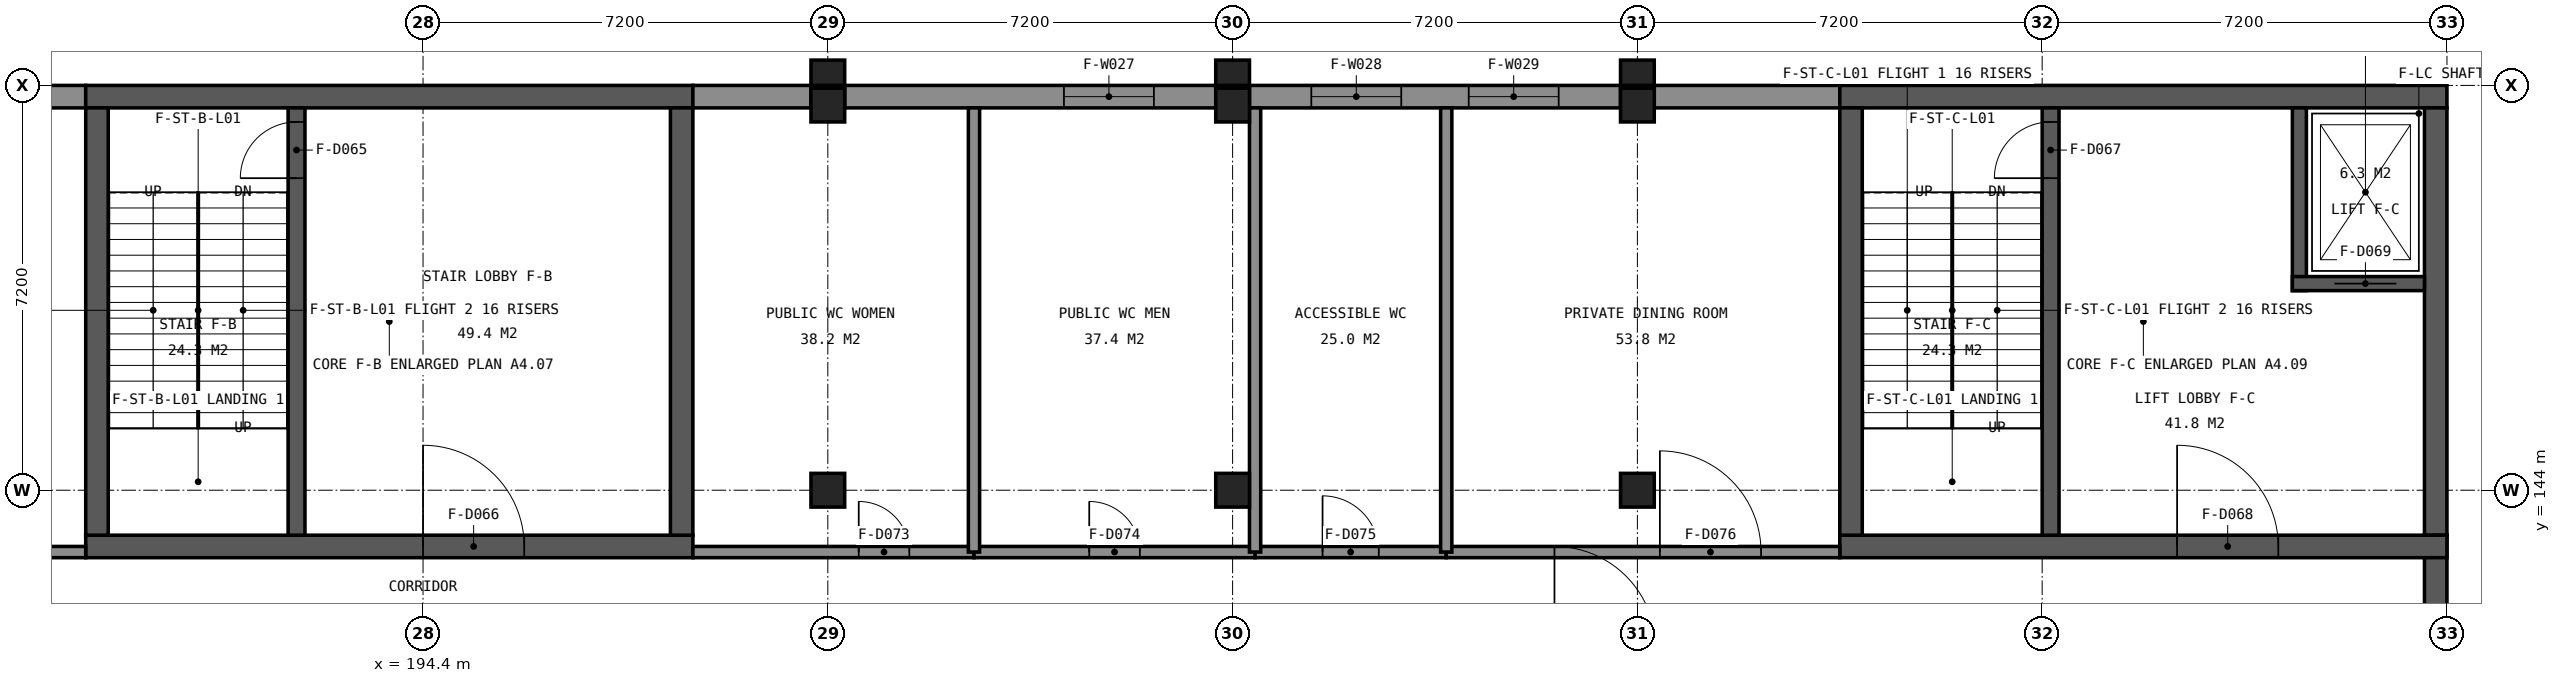
"""IFC4 building model, lengths in metres.
Left out: names, types, materials, properties, quantities, classifications, styles, units other than length and angle.
Written with IfcOpenShell. Run it as: python <this file> out.ifc"""

import sys

from ifc_helpers import new_model, si_unit, direction, frame, frame_2d, origin, origin_2d, place, context, subcontext, project, spatial, rectangle, extrude, element, fill, save


model = new_model("IFC4")
c1 = context("Model", 3, precision=1e-05, world=origin(), true_north=direction((0.0, 1.0)))
c2 = subcontext(c1, "Body", "Model", "MODEL_VIEW")
j1 = project(units=[si_unit("LENGTHUNIT", "METRE"), si_unit("PLANEANGLEUNIT", "RADIAN")], contexts=[c1])
p1 = place(None, origin())
s1 = spatial("IfcSite", under=j1, at=p1, CompositionType="ELEMENT")
p2 = place(p1, origin())
s2 = spatial("IfcBuilding", under=s1, at=p2, CompositionType="ELEMENT")
p3 = place(p2, frame((0.0, 0.0, 9.6)))
s3 = spatial("IfcBuildingStorey", under=s2, at=p3, CompositionType="ELEMENT", Elevation=9.6)
for number, where, z_axis, x_axis in (
    (1, (201.6, 144.0, 0.0), (0.0, 0.0, 1.0), (1.0, 0.0, 0.0)),
    (2, (208.8, 144.0, 0.0), (0.0, 0.0, 1.0), (1.0, 0.0, 0.0)),
    (3, (216.0, 144.0, 0.0), (0.0, 0.0, 1.0), (1.0, 0.0, 0.0)),
    (4, (201.6, 150.85, 0.0), (0.0, 0.0, 1.0), (1.0, 0.0, 0.0)),
    (5, (208.8, 150.85, 0.0), (0.0, 0.0, 1.0), (1.0, 0.0, 0.0)),
    (6, (216.0, 150.85, 0.0), (0.0, 0.0, 1.0), (1.0, 0.0, 0.0)),
):
    element("IfcColumn", number, at=place(p3, frame(where, z_axis=z_axis, x_axis=x_axis)), inside=s3, PredefinedType="COLUMN", context=c2, shape_type="SweptSolid", body=[
        extrude(rectangle(XDim=0.6, YDim=0.6, at=origin_2d()), origin(), (0.0, 0.0, 1.0), 4.8),
    ])
p4 = place(p3, frame((187.5, 151.0, 0.0), z_axis=(0.0, 0.0, 1.0), x_axis=(1.0, 0.0, 0.0)))
e7 = element("IfcWall", 7, at=p4, inside=s3, PredefinedType="SOLIDWALL", context=c2, shape_type="SweptSolid", body=[
    extrude(rectangle(XDim=0.9, YDim=0.4, at=frame_2d((0.45, 0.0))), origin(), (0.0, 0.0, 1.0), 3.95),
])
p5 = place(p3, frame((188.4, 151.0, 0.0), z_axis=(0.0, 0.0, 1.0), x_axis=(1.0, 0.0, 0.0)))
e8 = element("IfcWall", 8, at=p5, inside=s3, PredefinedType="SHEAR", context=c2, shape_type="SweptSolid", body=[
    extrude(rectangle(XDim=10.8, YDim=0.4, at=frame_2d((5.4, 0.0))), origin(), (0.0, 0.0, 1.0), 4.55),
])
p6 = place(p3, frame((199.2, 151.0, 0.0), z_axis=(0.0, 0.0, 1.0), x_axis=(1.0, 0.0, 0.0)))
e9 = element("IfcWall", 9, at=p6, inside=s3, PredefinedType="SOLIDWALL", context=c2, shape_type="SweptSolid", body=[
    extrude(rectangle(XDim=2.1, YDim=0.4, at=frame_2d((1.05, 0.0))), origin(), (0.0, 0.0, 1.0), 3.95),
])
p7 = place(p3, frame((201.9, 151.0, 0.0), z_axis=(0.0, 0.0, 1.0), x_axis=(1.0, 0.0, 0.0)))
e10 = element("IfcWall", 10, at=p7, inside=s3, PredefinedType="SOLIDWALL", context=c2, shape_type="SweptSolid", body=[
    extrude(rectangle(XDim=6.6, YDim=0.4, at=frame_2d((3.3, 0.0))), origin(), (0.0, 0.0, 1.0), 3.95),
])
p8 = place(p7, frame((3.9, 0.0, 0.8)))
e11 = element("IfcOpeningElement", 11, at=p8, cuts=e10, PredefinedType="OPENING", context=c2, shape_type="SweptSolid", body=[
    extrude(rectangle(XDim=1.6, YDim=3.1, at=frame_2d((0.8, 1.55))), frame((0.0, 0.21, 0.0), z_axis=(0.0, -1.0, 0.0), x_axis=(1.0, 0.0, 0.0)), (0.0, 0.0, 1.0), 0.42),
])
p9 = place(p3, frame((209.1, 151.0, 0.0), z_axis=(0.0, 0.0, 1.0), x_axis=(1.0, 0.0, 0.0)))
e12 = element("IfcWall", 12, at=p9, inside=s3, PredefinedType="SOLIDWALL", context=c2, shape_type="SweptSolid", body=[
    extrude(rectangle(XDim=6.6, YDim=0.4, at=frame_2d((3.3, 0.0))), origin(), (0.0, 0.0, 1.0), 3.95),
])
p10 = place(p9, frame((1.1, 0.0, 0.8)))
e13 = element("IfcOpeningElement", 13, at=p10, cuts=e12, PredefinedType="OPENING", context=c2, shape_type="SweptSolid", body=[
    extrude(rectangle(XDim=1.6, YDim=3.1, at=frame_2d((0.8, 1.55))), frame((0.0, 0.21, 0.0), z_axis=(0.0, -1.0, 0.0), x_axis=(1.0, 0.0, 0.0)), (0.0, 0.0, 1.0), 0.42),
])
p11 = place(p9, frame((3.9, 0.0, 0.8)))
e14 = element("IfcOpeningElement", 14, at=p11, cuts=e12, PredefinedType="OPENING", context=c2, shape_type="SweptSolid", body=[
    extrude(rectangle(XDim=1.6, YDim=3.1, at=frame_2d((0.8, 1.55))), frame((0.0, 0.21, 0.0), z_axis=(0.0, -1.0, 0.0), x_axis=(1.0, 0.0, 0.0)), (0.0, 0.0, 1.0), 0.42),
])
p12 = place(p3, frame((216.3, 151.0, 0.0), z_axis=(0.0, 0.0, 1.0), x_axis=(1.0, 0.0, 0.0)))
e15 = element("IfcWall", 15, at=p12, inside=s3, PredefinedType="SOLIDWALL", context=c2, shape_type="SweptSolid", body=[
    extrude(rectangle(XDim=3.3, YDim=0.4, at=frame_2d((1.65, 0.0))), origin(), (0.0, 0.0, 1.0), 3.95),
])
p13 = place(p3, frame((219.6, 151.0, 0.0), z_axis=(0.0, 0.0, 1.0), x_axis=(1.0, 0.0, 0.0)))
e16 = element("IfcWall", 16, at=p13, inside=s3, PredefinedType="SHEAR", context=c2, shape_type="SweptSolid", body=[
    extrude(rectangle(XDim=10.8, YDim=0.4, at=frame_2d((5.4, 0.0))), origin(), (0.0, 0.0, 1.0), 4.55),
])
p14 = place(p3, frame((230.2, 143.2, 0.0), z_axis=(0.0, 0.0, 1.0), x_axis=(0.0, -1.0, 0.0)))
e17 = element("IfcWall", 17, at=p14, inside=s3, PredefinedType="SHEAR", context=c2, shape_type="SweptSolid", body=[
    extrude(rectangle(XDim=6.1, YDim=0.4, at=frame_2d((3.05, 0.0))), origin(), (0.0, 0.0, 1.0), 3.95),
])
p15 = place(p14, frame((3.65, 0.0, 0.8)))
e18 = element("IfcOpeningElement", 18, at=p15, cuts=e17, PredefinedType="OPENING", context=c2, shape_type="SweptSolid", body=[
    extrude(rectangle(XDim=1.6, YDim=3.1, at=frame_2d((0.8, 1.55))), frame((0.0, 0.21, 0.0), z_axis=(0.0, -1.0, 0.0), x_axis=(1.0, 0.0, 0.0)), (0.0, 0.0, 1.0), 0.42),
])
p16 = place(p3, frame((230.2, 150.8, 0.0), z_axis=(0.0, 0.0, 1.0), x_axis=(0.0, -1.0, 0.0)))
e19 = element("IfcWall", 19, at=p16, inside=s3, PredefinedType="SHEAR", context=c2, shape_type="SweptSolid", body=[
    extrude(rectangle(XDim=7.6, YDim=0.4, at=frame_2d((3.8, 0.0))), origin(), (0.0, 0.0, 1.0), 4.55),
])
p17 = place(p3, frame((188.4, 143.0, 0.0), z_axis=(0.0, 0.0, 1.0), x_axis=(1.0, 0.0, 0.0)))
e20 = element("IfcWall", 20, at=p17, inside=s3, PredefinedType="SHEAR", context=c2, shape_type="SweptSolid", body=[
    extrude(rectangle(XDim=10.8, YDim=0.4, at=frame_2d((5.4, 0.0))), origin(), (0.0, 0.0, 1.0), 4.55),
])
p18 = place(p17, frame((6.0, 0.0, 0.0)))
e21 = element("IfcOpeningElement", 21, at=p18, cuts=e20, PredefinedType="OPENING", context=c2, shape_type="SweptSolid", body=[
    extrude(rectangle(XDim=1.8, YDim=2.1, at=frame_2d((0.9, 1.05))), frame((0.0, 0.21, 0.0), z_axis=(0.0, -1.0, 0.0), x_axis=(1.0, 0.0, 0.0)), (0.0, 0.0, 1.0), 0.42),
])
for number, where, z_axis, x_axis in (
    (22, (188.6, 143.2, 0.0), (0.0, 0.0, 1.0), (0.0, 1.0, 0.0)),
    (23, (199.0, 143.2, 0.0), (0.0, 0.0, 1.0), (0.0, 1.0, 0.0)),
):
    element("IfcWall", number, at=place(p3, frame(where, z_axis=z_axis, x_axis=x_axis)), inside=s3, PredefinedType="SHEAR", context=c2, shape_type="SweptSolid", body=[
        extrude(rectangle(XDim=7.6, YDim=0.4, at=frame_2d((3.8, 0.0))), origin(), (0.0, 0.0, 1.0), 4.55),
    ])
p19 = place(p3, frame((192.15, 143.2, 0.0), z_axis=(0.0, 0.0, 1.0), x_axis=(0.0, 1.0, 0.0)))
e24 = element("IfcWall", 24, at=p19, inside=s3, PredefinedType="SHEAR", context=c2, shape_type="SweptSolid", body=[
    extrude(rectangle(XDim=7.6, YDim=0.3, at=frame_2d((3.8, 0.0))), origin(), (0.0, 0.0, 1.0), 4.55),
])
p20 = place(p19, frame((6.35, 0.0, 0.0)))
e25 = element("IfcOpeningElement", 25, at=p20, cuts=e24, PredefinedType="OPENING", context=c2, shape_type="SweptSolid", body=[
    extrude(rectangle(XDim=1.0, YDim=2.1, at=frame_2d((0.5, 1.05))), frame((0.0, 0.16, 0.0), z_axis=(0.0, -1.0, 0.0), x_axis=(1.0, 0.0, 0.0)), (0.0, 0.0, 1.0), 0.32),
])
p21 = place(p3, frame((219.6, 143.0, 0.0), z_axis=(0.0, 0.0, 1.0), x_axis=(1.0, 0.0, 0.0)))
e26 = element("IfcWall", 26, at=p21, inside=s3, PredefinedType="SHEAR", context=c2, shape_type="SweptSolid", body=[
    extrude(rectangle(XDim=10.8, YDim=0.4, at=frame_2d((5.4, 0.0))), origin(), (0.0, 0.0, 1.0), 4.55),
])
p22 = place(p21, frame((6.0, 0.0, 0.0)))
e27 = element("IfcOpeningElement", 27, at=p22, cuts=e26, PredefinedType="OPENING", context=c2, shape_type="SweptSolid", body=[
    extrude(rectangle(XDim=1.8, YDim=2.1, at=frame_2d((0.9, 1.05))), frame((0.0, 0.21, 0.0), z_axis=(0.0, -1.0, 0.0), x_axis=(1.0, 0.0, 0.0)), (0.0, 0.0, 1.0), 0.42),
])
p23 = place(p3, frame((219.8, 143.2, 0.0), z_axis=(0.0, 0.0, 1.0), x_axis=(0.0, 1.0, 0.0)))
e28 = element("IfcWall", 28, at=p23, inside=s3, PredefinedType="SHEAR", context=c2, shape_type="SweptSolid", body=[
    extrude(rectangle(XDim=7.6, YDim=0.4, at=frame_2d((3.8, 0.0))), origin(), (0.0, 0.0, 1.0), 4.55),
])
p24 = place(p3, frame((223.35, 143.2, 0.0), z_axis=(0.0, 0.0, 1.0), x_axis=(0.0, 1.0, 0.0)))
e29 = element("IfcWall", 29, at=p24, inside=s3, PredefinedType="SHEAR", context=c2, shape_type="SweptSolid", body=[
    extrude(rectangle(XDim=7.6, YDim=0.3, at=frame_2d((3.8, 0.0))), origin(), (0.0, 0.0, 1.0), 4.55),
])
p25 = place(p24, frame((6.35, 0.0, 0.0)))
e30 = element("IfcOpeningElement", 30, at=p25, cuts=e29, PredefinedType="OPENING", context=c2, shape_type="SweptSolid", body=[
    extrude(rectangle(XDim=1.0, YDim=2.1, at=frame_2d((0.5, 1.05))), frame((0.0, 0.16, 0.0), z_axis=(0.0, -1.0, 0.0), x_axis=(1.0, 0.0, 0.0)), (0.0, 0.0, 1.0), 0.32),
])
p26 = place(p3, frame((227.775, 147.55, 0.0), z_axis=(0.0, 0.0, 1.0), x_axis=(0.0, 1.0, 0.0)))
e31 = element("IfcWall", 31, at=p26, inside=s3, PredefinedType="SHEAR", context=c2, shape_type="SweptSolid", body=[
    extrude(rectangle(XDim=3.25, YDim=0.25, at=frame_2d((1.625, 0.0))), origin(), (0.0, 0.0, 1.0), 4.55),
])
p27 = place(p3, frame((227.65, 147.675, 0.0), z_axis=(0.0, 0.0, 1.0), x_axis=(1.0, 0.0, 0.0)))
e32 = element("IfcWall", 32, at=p27, inside=s3, PredefinedType="SHEAR", context=c2, shape_type="SweptSolid", body=[
    extrude(rectangle(XDim=2.35, YDim=0.25, at=frame_2d((1.175, 0.0))), origin(), (0.0, 0.0, 1.0), 4.55),
])
p28 = place(p27, frame((0.75, 0.0, 0.0)))
e33 = element("IfcOpeningElement", 33, at=p28, cuts=e32, PredefinedType="OPENING", context=c2, shape_type="SweptSolid", body=[
    extrude(rectangle(XDim=1.1, YDim=2.1, at=frame_2d((0.55, 1.05))), frame((0.0, 0.135, 0.0), z_axis=(0.0, -1.0, 0.0), x_axis=(1.0, 0.0, 0.0)), (0.0, 0.0, 1.0), 0.27),
])
for number, where, z_axis, x_axis in (
    (34, (201.6, 151.425, 0.0), (0.0, 0.0, 1.0), (1.0, 0.0, 0.0)),
    (35, (208.8, 151.425, 0.0), (0.0, 0.0, 1.0), (1.0, 0.0, 0.0)),
    (36, (216.0, 151.425, 0.0), (0.0, 0.0, 1.0), (1.0, 0.0, 0.0)),
):
    element("IfcColumn", number, at=place(p3, frame(where, z_axis=z_axis, x_axis=x_axis)), inside=s3, PredefinedType="PILASTER", context=c2, shape_type="SweptSolid", body=[
        extrude(rectangle(XDim=0.6, YDim=0.45, at=origin_2d()), origin(), (0.0, 0.0, 1.0), 4.8),
    ])
p29 = place(p3, frame((169.2, 142.9, 0.0), z_axis=(0.0, 0.0, 1.0), x_axis=(1.0, 0.0, 0.0)))
e37 = element("IfcWall", 37, at=p29, inside=s3, PredefinedType="PARTITIONING", context=c2, shape_type="SweptSolid", body=[
    extrude(rectangle(XDim=19.2, YDim=0.2, at=frame_2d((9.6, 0.0))), origin(), (0.0, 0.0, 1.0), 3.95),
])
p30 = place(p29, frame((8.7, 0.0, 0.0)))
e38 = element("IfcOpeningElement", 38, at=p30, cuts=e37, PredefinedType="OPENING", context=c2, shape_type="SweptSolid", body=[
    extrude(rectangle(XDim=1.8, YDim=2.1, at=frame_2d((0.9, 1.05))), frame((0.0, 0.11, 0.0), z_axis=(0.0, -1.0, 0.0), x_axis=(1.0, 0.0, 0.0)), (0.0, 0.0, 1.0), 0.22),
])
p31 = place(p3, frame((199.2, 142.9, 0.0), z_axis=(0.0, 0.0, 1.0), x_axis=(1.0, 0.0, 0.0)))
e39 = element("IfcWall", 39, at=p31, inside=s3, PredefinedType="PARTITIONING", context=c2, shape_type="SweptSolid", body=[
    extrude(rectangle(XDim=5.0, YDim=0.2, at=frame_2d((2.5, 0.0))), origin(), (0.0, 0.0, 1.0), 3.95),
])
p32 = place(p31, frame((2.95, 0.0, 0.0)))
e40 = element("IfcOpeningElement", 40, at=p32, cuts=e39, PredefinedType="OPENING", context=c2, shape_type="SweptSolid", body=[
    extrude(rectangle(XDim=0.9, YDim=2.1, at=frame_2d((0.45, 1.05))), frame((0.0, 0.11, 0.0), z_axis=(0.0, -1.0, 0.0), x_axis=(1.0, 0.0, 0.0)), (0.0, 0.0, 1.0), 0.22),
])
p33 = place(p3, frame((204.2, 142.9, 0.0), z_axis=(0.0, 0.0, 1.0), x_axis=(1.0, 0.0, 0.0)))
e41 = element("IfcWall", 41, at=p33, inside=s3, PredefinedType="PARTITIONING", context=c2, shape_type="SweptSolid", body=[
    extrude(rectangle(XDim=5.0, YDim=0.2, at=frame_2d((2.5, 0.0))), origin(), (0.0, 0.0, 1.0), 3.95),
])
p34 = place(p33, frame((2.05, 0.0, 0.0)))
e42 = element("IfcOpeningElement", 42, at=p34, cuts=e41, PredefinedType="OPENING", context=c2, shape_type="SweptSolid", body=[
    extrude(rectangle(XDim=0.9, YDim=2.1, at=frame_2d((0.45, 1.05))), frame((0.0, 0.11, 0.0), z_axis=(0.0, -1.0, 0.0), x_axis=(1.0, 0.0, 0.0)), (0.0, 0.0, 1.0), 0.22),
])
p35 = place(p3, frame((209.2, 142.9, 0.0), z_axis=(0.0, 0.0, 1.0), x_axis=(1.0, 0.0, 0.0)))
e43 = element("IfcWall", 43, at=p35, inside=s3, PredefinedType="PARTITIONING", context=c2, shape_type="SweptSolid", body=[
    extrude(rectangle(XDim=3.4, YDim=0.2, at=frame_2d((1.7, 0.0))), origin(), (0.0, 0.0, 1.0), 3.95),
])
p36 = place(p35, frame((1.2, 0.0, 0.0)))
e44 = element("IfcOpeningElement", 44, at=p36, cuts=e43, PredefinedType="OPENING", context=c2, shape_type="SweptSolid", body=[
    extrude(rectangle(XDim=1.0, YDim=2.1, at=frame_2d((0.5, 1.05))), frame((0.0, 0.11, 0.0), z_axis=(0.0, -1.0, 0.0), x_axis=(1.0, 0.0, 0.0)), (0.0, 0.0, 1.0), 0.22),
])
p37 = place(p3, frame((212.6, 142.9, 0.0), z_axis=(0.0, 0.0, 1.0), x_axis=(1.0, 0.0, 0.0)))
e45 = element("IfcWall", 45, at=p37, inside=s3, PredefinedType="PARTITIONING", context=c2, shape_type="SweptSolid", body=[
    extrude(rectangle(XDim=7.0, YDim=0.2, at=frame_2d((3.5, 0.0))), origin(), (0.0, 0.0, 1.0), 3.95),
])
p38 = place(p37, frame((3.8, 0.0, 0.0)))
e46 = element("IfcOpeningElement", 46, at=p38, cuts=e45, PredefinedType="OPENING", context=c2, shape_type="SweptSolid", body=[
    extrude(rectangle(XDim=1.8, YDim=2.1, at=frame_2d((0.9, 1.05))), frame((0.0, 0.11, 0.0), z_axis=(0.0, -1.0, 0.0), x_axis=(1.0, 0.0, 0.0)), (0.0, 0.0, 1.0), 0.22),
])
for number, where, z_axis, x_axis in (
    (47, (204.2, 142.9, 0.0), (0.0, 0.0, 1.0), (0.0, 1.0, 0.0)),
    (48, (209.2, 142.9, 0.0), (0.0, 0.0, 1.0), (0.0, 1.0, 0.0)),
    (49, (212.6, 142.9, 0.0), (0.0, 0.0, 1.0), (0.0, 1.0, 0.0)),
):
    element("IfcWall", number, at=place(p3, frame(where, z_axis=z_axis, x_axis=x_axis)), inside=s3, PredefinedType="PARTITIONING", context=c2, shape_type="SweptSolid", body=[
        extrude(rectangle(XDim=7.9, YDim=0.2, at=frame_2d((3.95, 0.0))), origin(), (0.0, 0.0, 1.0), 3.95),
    ])
p39 = place(p8, origin())
e50 = element("IfcWindow", 50, at=p39, inside=s3, PartitioningType="SINGLE_PANEL", PredefinedType="WINDOW", context=c2, shape_type="SweptSolid", body=[
    extrude(rectangle(XDim=1.6, YDim=3.1, at=frame_2d((0.8, 1.55))), frame((0.0, -0.09, 0.0), z_axis=(0.0, -1.0, 0.0), x_axis=(1.0, 0.0, 0.0)), (0.0, 0.0, 1.0), 0.06),
])
fill(e11, e50)
p40 = place(p10, origin())
e51 = element("IfcWindow", 51, at=p40, inside=s3, PartitioningType="SINGLE_PANEL", PredefinedType="WINDOW", context=c2, shape_type="SweptSolid", body=[
    extrude(rectangle(XDim=1.6, YDim=3.1, at=frame_2d((0.8, 1.55))), frame((0.0, -0.09, 0.0), z_axis=(0.0, -1.0, 0.0), x_axis=(1.0, 0.0, 0.0)), (0.0, 0.0, 1.0), 0.06),
])
fill(e13, e51)
p41 = place(p11, origin())
e52 = element("IfcWindow", 52, at=p41, inside=s3, PartitioningType="SINGLE_PANEL", PredefinedType="WINDOW", context=c2, shape_type="SweptSolid", body=[
    extrude(rectangle(XDim=1.6, YDim=3.1, at=frame_2d((0.8, 1.55))), frame((0.0, -0.09, 0.0), z_axis=(0.0, -1.0, 0.0), x_axis=(1.0, 0.0, 0.0)), (0.0, 0.0, 1.0), 0.06),
])
fill(e14, e52)
p42 = place(p20, origin())
e53 = element("IfcDoor", 53, at=p42, inside=s3, OperationType="NOTDEFINED", PredefinedType="DOOR", context=c2, shape_type="SweptSolid", body=[
    extrude(rectangle(XDim=1.0, YDim=2.1, at=frame_2d((0.5, 1.05))), frame((0.0, 0.025, 0.0), z_axis=(0.0, -1.0, 0.0), x_axis=(1.0, 0.0, 0.0)), (0.0, 0.0, 1.0), 0.05),
])
fill(e25, e53)
p43 = place(p18, origin())
e54 = element("IfcDoor", 54, at=p43, inside=s3, OperationType="NOTDEFINED", PredefinedType="DOOR", context=c2, shape_type="SweptSolid", body=[
    extrude(rectangle(XDim=1.8, YDim=2.1, at=frame_2d((0.9, 1.05))), frame((0.0, 0.025, 0.0), z_axis=(0.0, -1.0, 0.0), x_axis=(1.0, 0.0, 0.0)), (0.0, 0.0, 1.0), 0.05),
])
fill(e21, e54)
p44 = place(p25, origin())
e55 = element("IfcDoor", 55, at=p44, inside=s3, OperationType="NOTDEFINED", PredefinedType="DOOR", context=c2, shape_type="SweptSolid", body=[
    extrude(rectangle(XDim=1.0, YDim=2.1, at=frame_2d((0.5, 1.05))), frame((0.0, 0.025, 0.0), z_axis=(0.0, -1.0, 0.0), x_axis=(1.0, 0.0, 0.0)), (0.0, 0.0, 1.0), 0.05),
])
fill(e30, e55)
p45 = place(p22, origin())
e56 = element("IfcDoor", 56, at=p45, inside=s3, OperationType="NOTDEFINED", PredefinedType="DOOR", context=c2, shape_type="SweptSolid", body=[
    extrude(rectangle(XDim=1.8, YDim=2.1, at=frame_2d((0.9, 1.05))), frame((0.0, 0.025, 0.0), z_axis=(0.0, -1.0, 0.0), x_axis=(1.0, 0.0, 0.0)), (0.0, 0.0, 1.0), 0.05),
])
fill(e27, e56)
p46 = place(p28, origin())
e57 = element("IfcDoor", 57, at=p46, inside=s3, OperationType="SLIDING_TO_LEFT", PredefinedType="DOOR", context=c2, shape_type="SweptSolid", body=[
    extrude(rectangle(XDim=1.1, YDim=2.1, at=frame_2d((0.55, 1.05))), frame((0.0, 0.025, 0.0), z_axis=(0.0, -1.0, 0.0), x_axis=(1.0, 0.0, 0.0)), (0.0, 0.0, 1.0), 0.05),
])
fill(e33, e57)
p47 = place(p32, origin())
e58 = element("IfcDoor", 58, at=p47, inside=s3, OperationType="NOTDEFINED", PredefinedType="DOOR", context=c2, shape_type="SweptSolid", body=[
    extrude(rectangle(XDim=0.9, YDim=2.1, at=frame_2d((0.45, 1.05))), frame((0.0, 0.025, 0.0), z_axis=(0.0, -1.0, 0.0), x_axis=(1.0, 0.0, 0.0)), (0.0, 0.0, 1.0), 0.05),
])
fill(e40, e58)
p48 = place(p34, origin())
e59 = element("IfcDoor", 59, at=p48, inside=s3, OperationType="NOTDEFINED", PredefinedType="DOOR", context=c2, shape_type="SweptSolid", body=[
    extrude(rectangle(XDim=0.9, YDim=2.1, at=frame_2d((0.45, 1.05))), frame((0.0, 0.025, 0.0), z_axis=(0.0, -1.0, 0.0), x_axis=(1.0, 0.0, 0.0)), (0.0, 0.0, 1.0), 0.05),
])
fill(e42, e59)
p49 = place(p36, origin())
e60 = element("IfcDoor", 60, at=p49, inside=s3, OperationType="NOTDEFINED", PredefinedType="DOOR", context=c2, shape_type="SweptSolid", body=[
    extrude(rectangle(XDim=1.0, YDim=2.1, at=frame_2d((0.5, 1.05))), frame((0.0, 0.025, 0.0), z_axis=(0.0, -1.0, 0.0), x_axis=(1.0, 0.0, 0.0)), (0.0, 0.0, 1.0), 0.05),
])
fill(e44, e60)
p50 = place(p38, origin())
e61 = element("IfcDoor", 61, at=p50, inside=s3, OperationType="NOTDEFINED", PredefinedType="DOOR", context=c2, shape_type="SweptSolid", body=[
    extrude(rectangle(XDim=1.8, YDim=2.1, at=frame_2d((0.9, 1.05))), frame((0.0, 0.025, 0.0), z_axis=(0.0, -1.0, 0.0), x_axis=(1.0, 0.0, 0.0)), (0.0, 0.0, 1.0), 0.05),
])
fill(e46, e61)
save(model, sys.argv[1])
